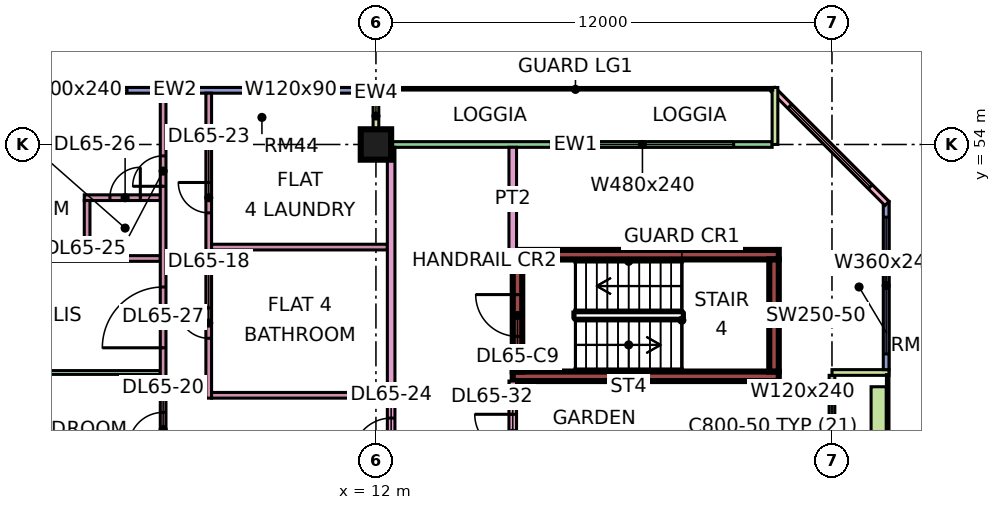
"""IFC4 building model, lengths in metres.
Left out: names, types, materials, properties, quantities, classifications, styles, units other than length and angle.
Written with IfcOpenShell. Run it as: python <this file> out.ifc"""

import sys

from ifc_helpers import new_model, si_unit, direction, frame, frame_2d, origin, origin_2d, place, context, subcontext, project, spatial, rectangle, extrude, element, fill, save


model = new_model("IFC4")
c1 = context("Model", 3, precision=1e-05, world=origin(), true_north=direction((0.0, 1.0)))
c2 = subcontext(c1, "Body", "Model", "MODEL_VIEW")
j1 = project(units=[si_unit("LENGTHUNIT", "METRE"), si_unit("PLANEANGLEUNIT", "RADIAN")], contexts=[c1])
p1 = place(None, origin())
s1 = spatial("IfcSite", under=j1, at=p1, CompositionType="ELEMENT")
p2 = place(p1, origin())
s2 = spatial("IfcBuilding", under=s1, at=p2, CompositionType="ELEMENT")
p3 = place(p2, frame((0.0, 0.0, 280.9)))
s3 = spatial("IfcBuildingStorey", under=s2, at=p3, CompositionType="ELEMENT", Elevation=280.9)
p4 = place(p3, frame((12.0, 54.0, 0.0), z_axis=(0.0, 0.0, 1.0), x_axis=(1.0, 0.0, 0.0)))
e1 = element("IfcColumn", 1, at=p4, inside=s3, PredefinedType="COLUMN", context=c2, shape_type="SweptSolid", body=[
    extrude(rectangle(XDim=0.8, YDim=0.8, at=origin_2d()), origin(), (0.0, 0.0, 1.0), 3.75),
])
for number, where, z_axis, x_axis in (
    (2, (15.6, 47.9, 0.0), (0.0, 0.0, 1.0), (1.0, 0.0, 0.0)),
    (3, (15.6, 51.1, 0.0), (0.0, 0.0, 1.0), (1.0, 0.0, 0.0)),
):
    element("IfcWall", number, at=place(p3, frame(where, z_axis=z_axis, x_axis=x_axis)), inside=s3, PredefinedType="SHEAR", context=c2, shape_type="SweptSolid", body=[
        extrude(rectangle(XDim=7.0, YDim=0.25, at=frame_2d((3.5, 0.0))), origin(), (0.0, 0.0, 1.0), 3.75),
    ])
p5 = place(p3, frame((15.725, 48.025, 0.0), z_axis=(0.0, 0.0, 1.0), x_axis=(0.0, 1.0, 0.0)))
e4 = element("IfcWall", 4, at=p5, inside=s3, PredefinedType="SHEAR", context=c2, shape_type="SweptSolid", body=[
    extrude(rectangle(XDim=2.95, YDim=0.25, at=frame_2d((1.475, 0.0))), origin(), (0.0, 0.0, 1.0), 3.75),
])
p6 = place(p5, frame((0.925, 0.0, 0.0)))
e5 = element("IfcOpeningElement", 5, at=p6, cuts=e4, PredefinedType="OPENING", context=c2, shape_type="SweptSolid", body=[
    extrude(rectangle(XDim=1.1, YDim=2.2, at=frame_2d((0.55, 1.1))), frame((0.0, 0.135, 0.0), z_axis=(0.0, -1.0, 0.0), x_axis=(1.0, 0.0, 0.0)), (0.0, 0.0, 1.0), 0.27),
])
p7 = place(p3, frame((22.475, 48.025, 0.0), z_axis=(0.0, 0.0, 1.0), x_axis=(0.0, 1.0, 0.0)))
e6 = element("IfcWall", 6, at=p7, inside=s3, PredefinedType="SHEAR", context=c2, shape_type="SweptSolid", body=[
    extrude(rectangle(XDim=2.95, YDim=0.25, at=frame_2d((1.475, 0.0))), origin(), (0.0, 0.0, 1.0), 3.75),
])
p8 = place(p3, frame((24.0, 40.575, 0.0), z_axis=(0.0, 0.0, 1.0), x_axis=(0.0, 1.0, 0.0)))
e7 = element("IfcWall", 7, at=p8, inside=s3, PredefinedType="SOLIDWALL", context=c2, shape_type="SweptSolid", body=[
    extrude(rectangle(XDim=7.35, YDim=0.15, at=frame_2d((3.675, 0.0))), origin(), (0.0, 0.0, 1.0), 3.35),
])
p9 = place(p8, frame((0.262, 0.0, 0.45)))
e8 = element("IfcOpeningElement", 8, at=p9, cuts=e7, PredefinedType="OPENING", context=c2, shape_type="SweptSolid", body=[
    extrude(rectangle(XDim=0.9, YDim=2.4, at=frame_2d((0.45, 1.2))), frame((0.0, 0.085, 0.0), z_axis=(0.0, -1.0, 0.0), x_axis=(1.0, 0.0, 0.0)), (0.0, 0.0, 1.0), 0.17),
])
p10 = place(p8, frame((2.075, 0.0, 0.0)))
e9 = element("IfcOpeningElement", 9, at=p10, cuts=e7, PredefinedType="OPENING", context=c2, shape_type="SweptSolid", body=[
    extrude(rectangle(XDim=1.2, YDim=2.4, at=frame_2d((0.6, 1.2))), frame((0.0, 0.085, 0.0), z_axis=(0.0, -1.0, 0.0), x_axis=(1.0, 0.0, 0.0)), (0.0, 0.0, 1.0), 0.17),
])
p11 = place(p8, frame((5.538, 0.0, 0.45)))
e10 = element("IfcOpeningElement", 10, at=p11, cuts=e7, PredefinedType="OPENING", context=c2, shape_type="SweptSolid", body=[
    extrude(rectangle(XDim=1.2, YDim=2.4, at=frame_2d((0.6, 1.2))), frame((0.0, 0.085, 0.0), z_axis=(0.0, -1.0, 0.0), x_axis=(1.0, 0.0, 0.0)), (0.0, 0.0, 1.0), 0.17),
])
p12 = place(p3, frame((25.5, 48.0, 0.0), z_axis=(0.0, 0.0, 1.0), x_axis=(-1.0, 0.0, 0.0)))
e11 = element("IfcWall", 11, at=p12, inside=s3, PredefinedType="SOLIDWALL", context=c2, shape_type="SweptSolid", body=[
    extrude(rectangle(XDim=1.5, YDim=0.15, at=frame_2d((0.75, 0.0))), origin(), (0.0, 0.0, 1.0), 3.35),
])
p13 = place(p3, frame((25.425, 48.075, 0.0), z_axis=(0.0, 0.0, 1.0), x_axis=(0.0, 1.0, 0.0)))
e12 = element("IfcWall", 12, at=p13, inside=s3, PredefinedType="SOLIDWALL", context=c2, shape_type="SweptSolid", body=[
    extrude(rectangle(XDim=4.425, YDim=0.15, at=frame_2d((2.212, 0.0))), origin(), (0.0, 0.0, 1.0), 3.35),
])
p14 = place(p13, frame((0.413, 0.0, 0.45)))
e13 = element("IfcOpeningElement", 13, at=p14, cuts=e12, PredefinedType="OPENING", context=c2, shape_type="SweptSolid", body=[
    extrude(rectangle(XDim=3.6, YDim=2.4, at=frame_2d((1.8, 1.2))), frame((0.0, 0.085, 0.0), z_axis=(0.0, -1.0, 0.0), x_axis=(1.0, 0.0, 0.0)), (0.0, 0.0, 1.0), 0.17),
])
p15 = place(p3, frame((25.447, 52.447, 0.0), z_axis=(0.0, 0.0, 1.0), x_axis=(-0.707106781187, 0.707106781187, 0.0)))
e14 = element("IfcWall", 14, at=p15, inside=s3, PredefinedType="SOLIDWALL", context=c2, shape_type="SweptSolid", body=[
    extrude(rectangle(XDim=4.243, YDim=0.15, at=frame_2d((2.121, 0.0))), origin(), (0.0, 0.0, 1.0), 3.35),
])
p16 = place(p15, frame((0.621, 0.0, 0.45)))
e15 = element("IfcOpeningElement", 15, at=p16, cuts=e14, PredefinedType="OPENING", context=c2, shape_type="SweptSolid", body=[
    extrude(rectangle(XDim=3.0, YDim=2.4, at=frame_2d((1.5, 1.2))), frame((0.0, 0.085, 0.0), z_axis=(0.0, -1.0, 0.0), x_axis=(1.0, 0.0, 0.0)), (0.0, 0.0, 1.0), 0.17),
])
p17 = place(p3, frame((22.425, 54.0, 0.0), z_axis=(0.0, 0.0, 1.0), x_axis=(-1.0, 0.0, 0.0)))
e16 = element("IfcWall", 16, at=p17, inside=s3, PredefinedType="SOLIDWALL", context=c2, shape_type="SweptSolid", body=[
    extrude(rectangle(XDim=10.35, YDim=0.15, at=frame_2d((5.175, 0.0))), origin(), (0.0, 0.0, 1.0), 3.35),
])
p18 = place(p17, frame((1.012, 0.0, 0.45)))
e17 = element("IfcOpeningElement", 17, at=p18, cuts=e16, PredefinedType="OPENING", context=c2, shape_type="SweptSolid", body=[
    extrude(rectangle(XDim=4.8, YDim=2.4, at=frame_2d((2.4, 1.2))), frame((0.0, 0.085, 0.0), z_axis=(0.0, -1.0, 0.0), x_axis=(1.0, 0.0, 0.0)), (0.0, 0.0, 1.0), 0.17),
])
for number, where, z_axis, x_axis in (
    (18, (22.5, 55.5, 0.0), (0.0, 0.0, 1.0), (0.0, -1.0, 0.0)),
    (19, (12.0, 55.5, 0.0), (0.0, 0.0, 1.0), (0.0, -1.0, 0.0)),
):
    element("IfcWall", number, at=place(p3, frame(where, z_axis=z_axis, x_axis=x_axis)), inside=s3, PredefinedType="SOLIDWALL", context=c2, shape_type="SweptSolid", body=[
        extrude(rectangle(XDim=1.5, YDim=0.15, at=frame_2d((0.75, 0.0))), origin(), (0.0, 0.0, 1.0), 3.35),
    ])
p19 = place(p3, frame((11.925, 55.425, 0.0), z_axis=(0.0, 0.0, 1.0), x_axis=(-1.0, 0.0, 0.0)))
e20 = element("IfcWall", 20, at=p19, inside=s3, PredefinedType="SOLIDWALL", context=c2, shape_type="SweptSolid", body=[
    extrude(rectangle(XDim=10.425, YDim=0.15, at=frame_2d((5.212, 0.0))), origin(), (0.0, 0.0, 1.0), 3.35),
])
p20 = place(p19, frame((1.562, 0.0, 1.7)))
e21 = element("IfcOpeningElement", 21, at=p20, cuts=e20, PredefinedType="OPENING", context=c2, shape_type="SweptSolid", body=[
    extrude(rectangle(XDim=1.2, YDim=0.9, at=frame_2d((0.6, 0.45))), frame((0.0, 0.085, 0.0), z_axis=(0.0, -1.0, 0.0), x_axis=(1.0, 0.0, 0.0)), (0.0, 0.0, 1.0), 0.17),
])
p21 = place(p19, frame((6.475, 0.0, 0.45)))
e22 = element("IfcOpeningElement", 22, at=p21, cuts=e20, PredefinedType="OPENING", context=c2, shape_type="SweptSolid", body=[
    extrude(rectangle(XDim=3.0, YDim=2.4, at=frame_2d((1.5, 1.2))), frame((0.0, 0.085, 0.0), z_axis=(0.0, -1.0, 0.0), x_axis=(1.0, 0.0, 0.0)), (0.0, 0.0, 1.0), 0.17),
])
p22 = place(p3, frame((25.229, 40.875, 0.0), z_axis=(0.0, 0.0, 1.0), x_axis=(0.0, 1.0, 0.0)))
e23 = element("IfcWall", 23, at=p22, inside=s3, PredefinedType="SOLIDWALL", context=c2, shape_type="SweptSolid", body=[
    extrude(rectangle(XDim=6.75, YDim=0.4, at=frame_2d((3.375, 0.0))), origin(), (0.0, 0.0, 1.0), 0.7),
])
p23 = place(p3, frame((-1.351, 51.0, 0.0), z_axis=(0.0, 0.0, 1.0), x_axis=(1.0, 0.0, 0.0)))
e24 = element("IfcWall", 24, at=p23, inside=s3, PredefinedType="PARTITIONING", context=c2, shape_type="SweptSolid", body=[
    extrude(rectangle(XDim=7.676, YDim=0.15, at=frame_2d((3.838, 0.0))), origin(), (0.0, 0.0, 1.0), 3.35),
])
p24 = place(p3, frame((0.0, 48.0, 0.0), z_axis=(0.0, 0.0, 1.0), x_axis=(1.0, 0.0, 0.0)))
e25 = element("IfcWall", 25, at=p24, inside=s3, PredefinedType="PARTITIONING", context=c2, shape_type="SweptSolid", body=[
    extrude(rectangle(XDim=6.325, YDim=0.1, at=frame_2d((3.163, 0.0))), origin(), (0.0, 0.0, 1.0), 3.35),
])
p25 = place(p3, frame((4.325, 52.6, 0.0), z_axis=(0.0, 0.0, 1.0), x_axis=(1.0, 0.0, 0.0)))
e26 = element("IfcWall", 26, at=p25, inside=s3, PredefinedType="PARTITIONING", context=c2, shape_type="SweptSolid", body=[
    extrude(rectangle(XDim=2.0, YDim=0.15, at=frame_2d((1.0, 0.0))), origin(), (0.0, 0.0, 1.0), 3.35),
])
p26 = place(p25, frame((0.675, 0.0, 0.0)))
e27 = element("IfcOpeningElement", 27, at=p26, cuts=e26, PredefinedType="OPENING", context=c2, shape_type="SweptSolid", body=[
    extrude(rectangle(XDim=0.8, YDim=2.1, at=frame_2d((0.4, 1.05))), frame((0.0, 0.085, 0.0), z_axis=(0.0, -1.0, 0.0), x_axis=(1.0, 0.0, 0.0)), (0.0, 0.0, 1.0), 0.17),
])
p27 = place(p3, frame((4.4, 51.075, 0.0), z_axis=(0.0, 0.0, 1.0), x_axis=(0.0, 1.0, 0.0)))
e28 = element("IfcWall", 28, at=p27, inside=s3, PredefinedType="PARTITIONING", context=c2, shape_type="SweptSolid", body=[
    extrude(rectangle(XDim=1.45, YDim=0.15, at=frame_2d((0.725, 0.0))), origin(), (0.0, 0.0, 1.0), 3.35),
])
p28 = place(p3, frame((6.4, 41.95, 0.0), z_axis=(0.0, 0.0, 1.0), x_axis=(0.0, 1.0, 0.0)))
e29 = element("IfcWall", 29, at=p28, inside=s3, PredefinedType="PARTITIONING", context=c2, shape_type="SweptSolid", body=[
    extrude(rectangle(XDim=13.4, YDim=0.15, at=frame_2d((6.7, 0.0))), origin(), (0.0, 0.0, 1.0), 3.35),
])
p29 = place(p28, frame((1.1, 0.0, 0.0)))
e30 = element("IfcOpeningElement", 30, at=p29, cuts=e29, PredefinedType="OPENING", context=c2, shape_type="SweptSolid", body=[
    extrude(rectangle(XDim=0.9, YDim=2.1, at=frame_2d((0.45, 1.05))), frame((0.0, 0.085, 0.0), z_axis=(0.0, -1.0, 0.0), x_axis=(1.0, 0.0, 0.0)), (0.0, 0.0, 1.0), 0.17),
])
p30 = place(p28, frame((4.1, 0.0, 0.0)))
e31 = element("IfcOpeningElement", 31, at=p30, cuts=e29, PredefinedType="OPENING", context=c2, shape_type="SweptSolid", body=[
    extrude(rectangle(XDim=0.9, YDim=2.1, at=frame_2d((0.45, 1.05))), frame((0.0, 0.085, 0.0), z_axis=(0.0, -1.0, 0.0), x_axis=(1.0, 0.0, 0.0)), (0.0, 0.0, 1.0), 0.17),
])
p31 = place(p28, frame((10.95, 0.0, 0.0)))
e32 = element("IfcOpeningElement", 32, at=p31, cuts=e29, PredefinedType="OPENING", context=c2, shape_type="SweptSolid", body=[
    extrude(rectangle(XDim=0.8, YDim=2.1, at=frame_2d((0.4, 1.05))), frame((0.0, 0.085, 0.0), z_axis=(0.0, -1.0, 0.0), x_axis=(1.0, 0.0, 0.0)), (0.0, 0.0, 1.0), 0.17),
])
p32 = place(p28, frame((6.7, 0.0, 0.0)))
e33 = element("IfcOpeningElement", 33, at=p32, cuts=e29, PredefinedType="OPENING", context=c2, shape_type="SweptSolid", body=[
    extrude(rectangle(XDim=1.6, YDim=2.1, at=frame_2d((0.8, 1.05))), frame((0.0, 0.085, 0.0), z_axis=(0.0, -1.0, 0.0), x_axis=(1.0, 0.0, 0.0)), (0.0, 0.0, 1.0), 0.17),
])
p33 = place(p3, frame((7.6, 47.325, 0.0), z_axis=(0.0, 0.0, 1.0), x_axis=(0.0, 1.0, 0.0)))
e34 = element("IfcWall", 34, at=p33, inside=s3, PredefinedType="PARTITIONING", context=c2, shape_type="SweptSolid", body=[
    extrude(rectangle(XDim=8.025, YDim=0.15, at=frame_2d((4.013, 0.0))), origin(), (0.0, 0.0, 1.0), 3.35),
])
p34 = place(p33, frame((1.575, 0.0, 0.0)))
e35 = element("IfcOpeningElement", 35, at=p34, cuts=e34, PredefinedType="OPENING", context=c2, shape_type="SweptSolid", body=[
    extrude(rectangle(XDim=0.8, YDim=2.1, at=frame_2d((0.4, 1.05))), frame((0.0, 0.085, 0.0), z_axis=(0.0, -1.0, 0.0), x_axis=(1.0, 0.0, 0.0)), (0.0, 0.0, 1.0), 0.17),
])
p35 = place(p33, frame((4.875, 0.0, 0.0)))
e36 = element("IfcOpeningElement", 36, at=p35, cuts=e34, PredefinedType="OPENING", context=c2, shape_type="SweptSolid", body=[
    extrude(rectangle(XDim=0.8, YDim=2.1, at=frame_2d((0.4, 1.05))), frame((0.0, 0.085, 0.0), z_axis=(0.0, -1.0, 0.0), x_axis=(1.0, 0.0, 0.0)), (0.0, 0.0, 1.0), 0.17),
])
for number, where, z_axis, x_axis in (
    (37, (7.675, 47.4, 0.0), (0.0, 0.0, 1.0), (1.0, 0.0, 0.0)),
    (38, (7.675, 51.3, 0.0), (0.0, 0.0, 1.0), (1.0, 0.0, 0.0)),
):
    element("IfcWall", number, at=place(p3, frame(where, z_axis=z_axis, x_axis=x_axis)), inside=s3, PredefinedType="PARTITIONING", context=c2, shape_type="SweptSolid", body=[
        extrude(rectangle(XDim=4.625, YDim=0.15, at=frame_2d((2.312, 0.0))), origin(), (0.0, 0.0, 1.0), 3.35),
    ])
p36 = place(p3, frame((12.4, 20.0, 0.0), z_axis=(0.0, 0.0, 1.0), x_axis=(0.0, 1.0, 0.0)))
e39 = element("IfcWall", 39, at=p36, inside=s3, PredefinedType="PARTITIONING", context=c2, shape_type="SweptSolid", body=[
    extrude(rectangle(XDim=33.926, YDim=0.2, at=frame_2d((16.963, 0.0))), origin(), (0.0, 0.0, 1.0), 3.35),
])
p37 = place(p36, frame((25.8, 0.0, 0.0)))
e40 = element("IfcOpeningElement", 40, at=p37, cuts=e39, PredefinedType="OPENING", context=c2, shape_type="SweptSolid", body=[
    extrude(rectangle(XDim=1.0, YDim=2.1, at=frame_2d((0.5, 1.05))), frame((0.0, 0.11, 0.0), z_axis=(0.0, -1.0, 0.0), x_axis=(1.0, 0.0, 0.0)), (0.0, 0.0, 1.0), 0.22),
])
p38 = place(p36, frame((0.6, 0.0, 0.0)))
e41 = element("IfcOpeningElement", 41, at=p38, cuts=e39, PredefinedType="OPENING", context=c2, shape_type="SweptSolid", body=[
    extrude(rectangle(XDim=1.2, YDim=2.1, at=frame_2d((0.6, 1.05))), frame((0.0, 0.11, 0.0), z_axis=(0.0, -1.0, 0.0), x_axis=(1.0, 0.0, 0.0)), (0.0, 0.0, 1.0), 0.22),
])
p39 = place(p36, frame((4.5, 0.0, 0.0)))
e42 = element("IfcOpeningElement", 42, at=p39, cuts=e39, PredefinedType="OPENING", context=c2, shape_type="SweptSolid", body=[
    extrude(rectangle(XDim=1.0, YDim=2.1, at=frame_2d((0.5, 1.05))), frame((0.0, 0.11, 0.0), z_axis=(0.0, -1.0, 0.0), x_axis=(1.0, 0.0, 0.0)), (0.0, 0.0, 1.0), 0.22),
])
p40 = place(p3, frame((15.6, 20.0, 0.0), z_axis=(0.0, 0.0, 1.0), x_axis=(0.0, 1.0, 0.0)))
e43 = element("IfcWall", 43, at=p40, inside=s3, PredefinedType="PARTITIONING", context=c2, shape_type="SweptSolid", body=[
    extrude(rectangle(XDim=27.775, YDim=0.2, at=frame_2d((13.887, 0.0))), origin(), (0.0, 0.0, 1.0), 3.35),
])
p41 = place(p40, frame((5.95, 0.0, 0.0)))
e44 = element("IfcOpeningElement", 44, at=p41, cuts=e43, PredefinedType="OPENING", context=c2, shape_type="SweptSolid", body=[
    extrude(rectangle(XDim=1.0, YDim=2.1, at=frame_2d((0.5, 1.05))), frame((0.0, 0.11, 0.0), z_axis=(0.0, -1.0, 0.0), x_axis=(1.0, 0.0, 0.0)), (0.0, 0.0, 1.0), 0.22),
])
p42 = place(p40, frame((12.0, 0.0, 0.0)))
e45 = element("IfcOpeningElement", 45, at=p42, cuts=e43, PredefinedType="OPENING", context=c2, shape_type="SweptSolid", body=[
    extrude(rectangle(XDim=1.0, YDim=2.1, at=frame_2d((0.5, 1.05))), frame((0.0, 0.11, 0.0), z_axis=(0.0, -1.0, 0.0), x_axis=(1.0, 0.0, 0.0)), (0.0, 0.0, 1.0), 0.22),
])
p43 = place(p40, frame((22.9, 0.0, 0.0)))
e46 = element("IfcOpeningElement", 46, at=p43, cuts=e43, PredefinedType="OPENING", context=c2, shape_type="SweptSolid", body=[
    extrude(rectangle(XDim=1.0, YDim=2.1, at=frame_2d((0.5, 1.05))), frame((0.0, 0.11, 0.0), z_axis=(0.0, -1.0, 0.0), x_axis=(1.0, 0.0, 0.0)), (0.0, 0.0, 1.0), 0.22),
])
p44 = place(p40, frame((1.15, 0.0, 0.0)))
e47 = element("IfcOpeningElement", 47, at=p44, cuts=e43, PredefinedType="OPENING", context=c2, shape_type="SweptSolid", body=[
    extrude(rectangle(XDim=1.8, YDim=2.1, at=frame_2d((0.9, 1.05))), frame((0.0, 0.11, 0.0), z_axis=(0.0, -1.0, 0.0), x_axis=(1.0, 0.0, 0.0)), (0.0, 0.0, 1.0), 0.22),
])
p45 = place(p40, frame((25.9, 0.0, 0.0)))
e48 = element("IfcOpeningElement", 48, at=p45, cuts=e43, PredefinedType="OPENING", context=c2, shape_type="SweptSolid", body=[
    extrude(rectangle(XDim=1.0, YDim=2.1, at=frame_2d((0.5, 1.05))), frame((0.0, 0.11, 0.0), z_axis=(0.0, -1.0, 0.0), x_axis=(1.0, 0.0, 0.0)), (0.0, 0.0, 1.0), 0.22),
])
p46 = place(p3, frame((15.6, 51.225, 0.0), z_axis=(0.0, 0.0, 1.0), x_axis=(0.0, 1.0, 0.0)))
e49 = element("IfcWall", 49, at=p46, inside=s3, PredefinedType="PARTITIONING", context=c2, shape_type="SweptSolid", body=[
    extrude(rectangle(XDim=2.701, YDim=0.2, at=frame_2d((1.351, 0.0))), origin(), (0.0, 0.0, 1.0), 3.35),
])
p47 = place(p11, origin())
e50 = element("IfcWindow", 50, at=p47, inside=s3, PartitioningType="SINGLE_PANEL", PredefinedType="WINDOW", context=c2, shape_type="SweptSolid", body=[
    extrude(rectangle(XDim=1.2, YDim=2.4, at=frame_2d((0.6, 1.2))), frame((0.0, 0.03, 0.0), z_axis=(0.0, -1.0, 0.0), x_axis=(1.0, 0.0, 0.0)), (0.0, 0.0, 1.0), 0.06),
])
fill(e10, e50)
p48 = place(p14, origin())
e51 = element("IfcWindow", 51, at=p48, inside=s3, PartitioningType="SINGLE_PANEL", PredefinedType="WINDOW", context=c2, shape_type="SweptSolid", body=[
    extrude(rectangle(XDim=3.6, YDim=2.4, at=frame_2d((1.8, 1.2))), frame((0.0, 0.03, 0.0), z_axis=(0.0, -1.0, 0.0), x_axis=(1.0, 0.0, 0.0)), (0.0, 0.0, 1.0), 0.06),
])
fill(e13, e51)
p49 = place(p16, origin())
e52 = element("IfcWindow", 52, at=p49, inside=s3, PartitioningType="SINGLE_PANEL", PredefinedType="WINDOW", context=c2, shape_type="SweptSolid", body=[
    extrude(rectangle(XDim=3.0, YDim=2.4, at=frame_2d((1.5, 1.2))), frame((0.0, 0.03, 0.0), z_axis=(0.0, -1.0, 0.0), x_axis=(1.0, 0.0, 0.0)), (0.0, 0.0, 1.0), 0.06),
])
fill(e15, e52)
p50 = place(p18, origin())
e53 = element("IfcWindow", 53, at=p50, inside=s3, PartitioningType="SINGLE_PANEL", PredefinedType="WINDOW", context=c2, shape_type="SweptSolid", body=[
    extrude(rectangle(XDim=4.8, YDim=2.4, at=frame_2d((2.4, 1.2))), frame((0.0, 0.03, 0.0), z_axis=(0.0, -1.0, 0.0), x_axis=(1.0, 0.0, 0.0)), (0.0, 0.0, 1.0), 0.06),
])
fill(e17, e53)
p51 = place(p20, origin())
e54 = element("IfcWindow", 54, at=p51, inside=s3, PartitioningType="SINGLE_PANEL", PredefinedType="WINDOW", context=c2, shape_type="SweptSolid", body=[
    extrude(rectangle(XDim=1.2, YDim=0.9, at=frame_2d((0.6, 0.45))), frame((0.0, 0.03, 0.0), z_axis=(0.0, -1.0, 0.0), x_axis=(1.0, 0.0, 0.0)), (0.0, 0.0, 1.0), 0.06),
])
fill(e21, e54)
p52 = place(p21, origin())
e55 = element("IfcWindow", 55, at=p52, inside=s3, PartitioningType="SINGLE_PANEL", PredefinedType="WINDOW", context=c2, shape_type="SweptSolid", body=[
    extrude(rectangle(XDim=3.0, YDim=2.4, at=frame_2d((1.5, 1.2))), frame((0.0, 0.03, 0.0), z_axis=(0.0, -1.0, 0.0), x_axis=(1.0, 0.0, 0.0)), (0.0, 0.0, 1.0), 0.06),
])
fill(e22, e55)
p53 = place(p6, frame((1.1, 0.0, 0.0), z_axis=(0.0, 0.0, 1.0), x_axis=(-1.0, 0.0, 0.0)))
e56 = element("IfcDoor", 56, at=p53, inside=s3, OperationType="SINGLE_SWING_RIGHT", PredefinedType="DOOR", context=c2, shape_type="SweptSolid", body=[
    extrude(rectangle(XDim=1.1, YDim=2.2, at=frame_2d((0.55, 1.1))), frame((0.0, 0.025, 0.0), z_axis=(0.0, -1.0, 0.0), x_axis=(1.0, 0.0, 0.0)), (0.0, 0.0, 1.0), 0.05),
])
fill(e5, e56)
p54 = place(p34, frame((0.8, 0.0, 0.0), z_axis=(0.0, 0.0, 1.0), x_axis=(-1.0, 0.0, 0.0)))
e57 = element("IfcDoor", 57, at=p54, inside=s3, OperationType="SINGLE_SWING_RIGHT", PredefinedType="DOOR", context=c2, shape_type="SweptSolid", body=[
    extrude(rectangle(XDim=0.8, YDim=2.1, at=frame_2d((0.4, 1.05))), frame((0.0, 0.025, 0.0), z_axis=(0.0, -1.0, 0.0), x_axis=(1.0, 0.0, 0.0)), (0.0, 0.0, 1.0), 0.05),
])
fill(e35, e57)
p55 = place(p30, origin())
e58 = element("IfcDoor", 58, at=p55, inside=s3, OperationType="SINGLE_SWING_LEFT", PredefinedType="DOOR", context=c2, shape_type="SweptSolid", body=[
    extrude(rectangle(XDim=0.9, YDim=2.1, at=frame_2d((0.45, 1.05))), frame((0.0, 0.025, 0.0), z_axis=(0.0, -1.0, 0.0), x_axis=(1.0, 0.0, 0.0)), (0.0, 0.0, 1.0), 0.05),
])
fill(e31, e58)
p56 = place(p35, frame((0.8, 0.0, 0.0), z_axis=(0.0, 0.0, 1.0), x_axis=(-1.0, 0.0, 0.0)))
e59 = element("IfcDoor", 59, at=p56, inside=s3, OperationType="SINGLE_SWING_RIGHT", PredefinedType="DOOR", context=c2, shape_type="SweptSolid", body=[
    extrude(rectangle(XDim=0.8, YDim=2.1, at=frame_2d((0.4, 1.05))), frame((0.0, 0.025, 0.0), z_axis=(0.0, -1.0, 0.0), x_axis=(1.0, 0.0, 0.0)), (0.0, 0.0, 1.0), 0.05),
])
fill(e36, e59)
p57 = place(p37, origin())
e60 = element("IfcDoor", 60, at=p57, inside=s3, OperationType="SINGLE_SWING_LEFT", PredefinedType="DOOR", context=c2, shape_type="SweptSolid", body=[
    extrude(rectangle(XDim=1.0, YDim=2.1, at=frame_2d((0.5, 1.05))), frame((0.0, 0.025, 0.0), z_axis=(0.0, -1.0, 0.0), x_axis=(1.0, 0.0, 0.0)), (0.0, 0.0, 1.0), 0.05),
])
fill(e40, e60)
p58 = place(p31, origin())
e61 = element("IfcDoor", 61, at=p58, inside=s3, OperationType="SINGLE_SWING_LEFT", PredefinedType="DOOR", context=c2, shape_type="SweptSolid", body=[
    extrude(rectangle(XDim=0.8, YDim=2.1, at=frame_2d((0.4, 1.05))), frame((0.0, 0.025, 0.0), z_axis=(0.0, -1.0, 0.0), x_axis=(1.0, 0.0, 0.0)), (0.0, 0.0, 1.0), 0.05),
])
fill(e32, e61)
p59 = place(p26, frame((0.8, 0.0, 0.0), z_axis=(0.0, 0.0, 1.0), x_axis=(-1.0, 0.0, 0.0)))
e62 = element("IfcDoor", 62, at=p59, inside=s3, OperationType="SINGLE_SWING_RIGHT", PredefinedType="DOOR", context=c2, shape_type="SweptSolid", body=[
    extrude(rectangle(XDim=0.8, YDim=2.1, at=frame_2d((0.4, 1.05))), frame((0.0, 0.025, 0.0), z_axis=(0.0, -1.0, 0.0), x_axis=(1.0, 0.0, 0.0)), (0.0, 0.0, 1.0), 0.05),
])
fill(e27, e62)
p60 = place(p32, origin())
e63 = element("IfcDoor", 63, at=p60, inside=s3, OperationType="DOUBLE_DOOR_SINGLE_SWING", PredefinedType="DOOR", context=c2, shape_type="SweptSolid", body=[
    extrude(rectangle(XDim=1.6, YDim=2.1, at=frame_2d((0.8, 1.05))), frame((0.0, 0.025, 0.0), z_axis=(0.0, -1.0, 0.0), x_axis=(1.0, 0.0, 0.0)), (0.0, 0.0, 1.0), 0.05),
])
fill(e33, e63)
p61 = place(p45, frame((1.0, 0.0, 0.0), z_axis=(0.0, 0.0, 1.0), x_axis=(-1.0, 0.0, 0.0)))
e64 = element("IfcDoor", 64, at=p61, inside=s3, OperationType="SINGLE_SWING_RIGHT", PredefinedType="DOOR", context=c2, shape_type="SweptSolid", body=[
    extrude(rectangle(XDim=1.0, YDim=2.1, at=frame_2d((0.5, 1.05))), frame((0.0, 0.025, 0.0), z_axis=(0.0, -1.0, 0.0), x_axis=(1.0, 0.0, 0.0)), (0.0, 0.0, 1.0), 0.05),
])
fill(e48, e64)
save(model, sys.argv[1])
